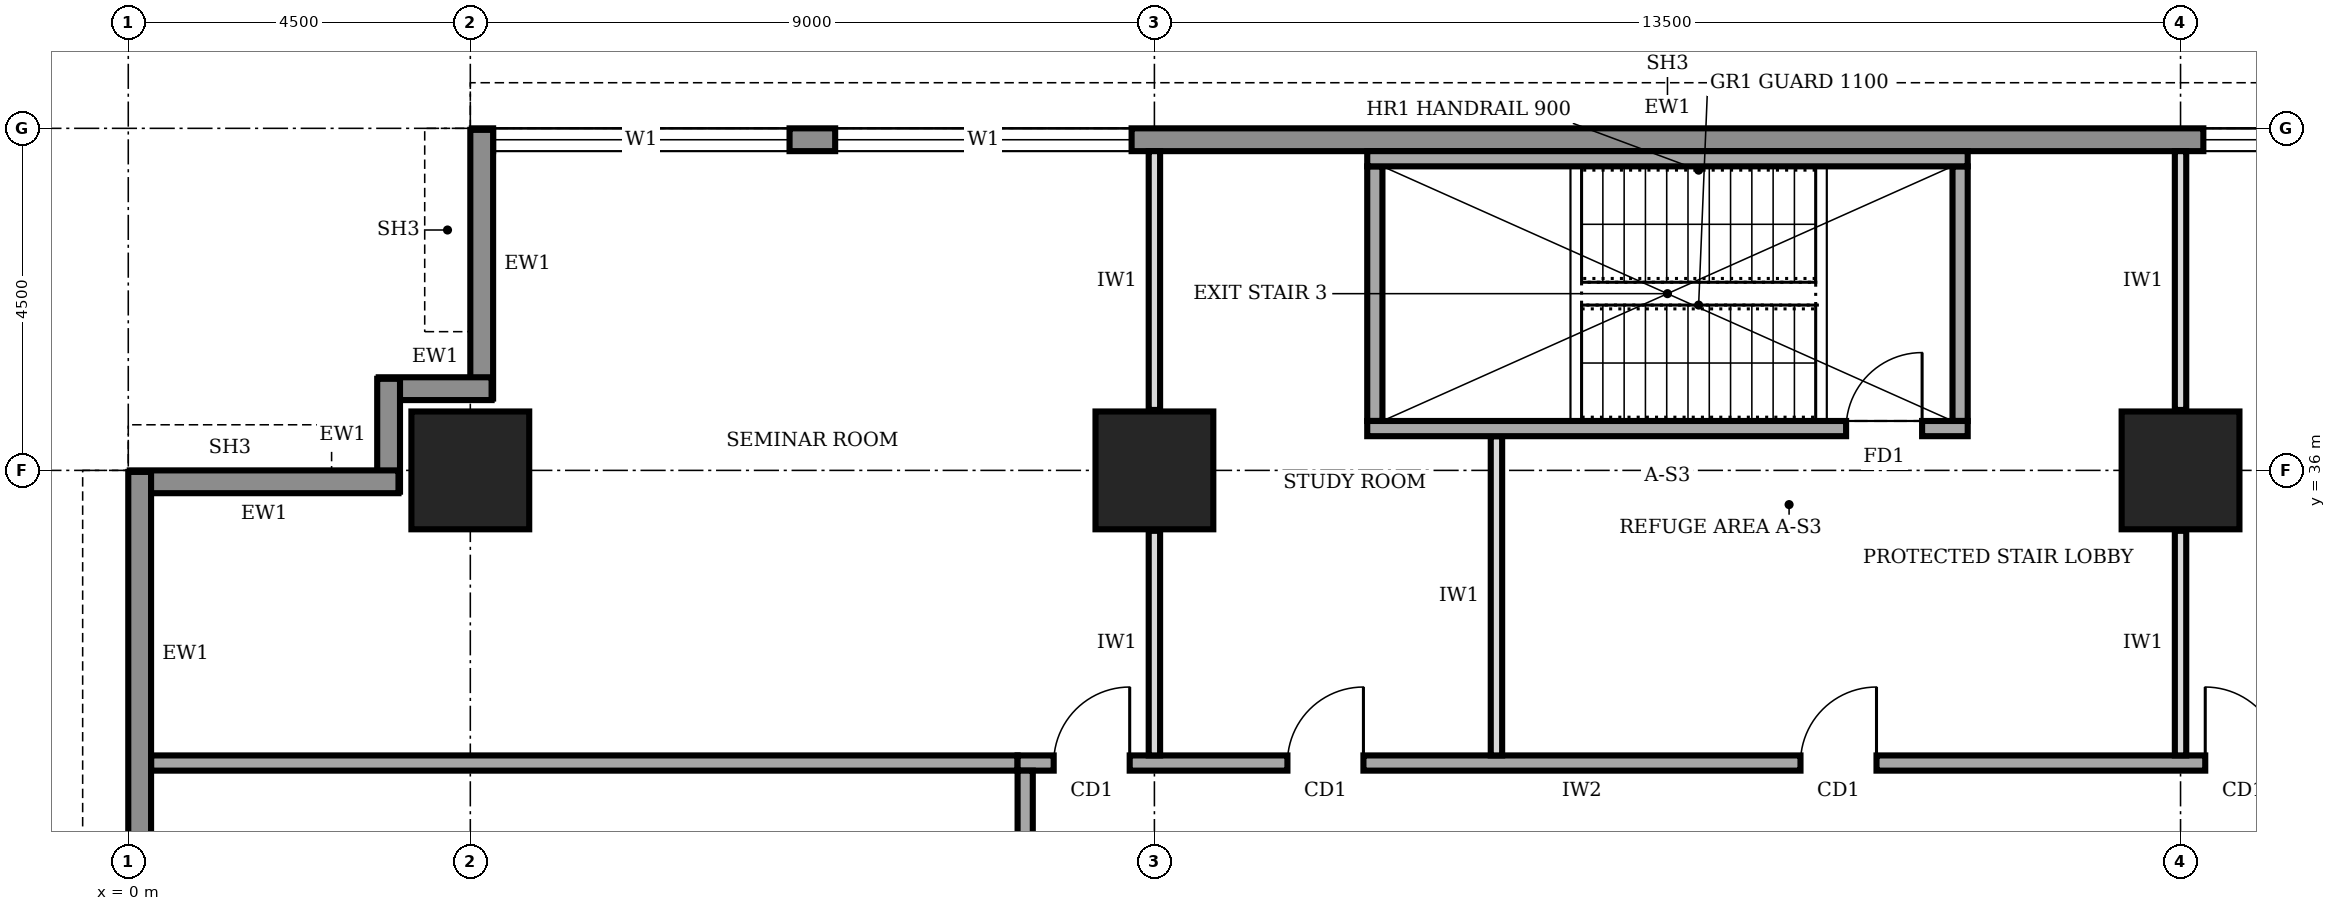
"""IFC4 building model, lengths in metres.
Left out: names, types, materials, properties, quantities, classifications, styles, units other than length and angle.
Written with IfcOpenShell. Run it as: python <this file> out.ifc"""

import sys

from ifc_helpers import new_model, si_unit, direction, frame, frame_2d, origin, origin_2d, place, context, subcontext, project, spatial, rectangle, extrude, element, fill, save


model = new_model("IFC4")
c1 = context("Model", 3, precision=1e-05, world=origin(), true_north=direction((0.0, 1.0)))
c2 = subcontext(c1, "Body", "Model", "MODEL_VIEW")
j1 = project(units=[si_unit("LENGTHUNIT", "METRE"), si_unit("PLANEANGLEUNIT", "RADIAN")], contexts=[c1])
p1 = place(None, origin())
s1 = spatial("IfcSite", under=j1, at=p1, CompositionType="ELEMENT")
p2 = place(p1, origin())
s2 = spatial("IfcBuilding", under=s1, at=p2, CompositionType="ELEMENT")
p3 = place(p2, frame((0.0, 0.0, 217.0)))
s3 = spatial("IfcBuildingStorey", under=s2, at=p3, CompositionType="ELEMENT", Elevation=217.0)
for number, where, z_axis, x_axis in (
    (1, (4.5, 36.0, 0.0), (0.0, 0.0, 1.0), (1.0, 0.0, 0.0)),
    (2, (13.5, 36.0, 0.0), (0.0, 0.0, 1.0), (1.0, 0.0, 0.0)),
    (3, (27.0, 36.0, 0.0), (0.0, 0.0, 1.0), (1.0, 0.0, 0.0)),
):
    element("IfcColumn", number, at=place(p3, frame(where, z_axis=z_axis, x_axis=x_axis)), inside=s3, PredefinedType="COLUMN", context=c2, shape_type="SweptSolid", body=[
        extrude(rectangle(XDim=1.55, YDim=1.55, at=origin_2d()), origin(), (0.0, 0.0, 1.0), 4.0),
    ])
p4 = place(p3, frame((35.98, 40.35, 0.0), z_axis=(0.0, 0.0, 1.0), x_axis=(-1.0, 0.0, 0.0)))
e4 = element("IfcWall", 4, at=p4, inside=s3, PredefinedType="STANDARD", context=c2, shape_type="SweptSolid", body=[
    extrude(rectangle(XDim=31.46, YDim=0.3, at=frame_2d((15.73, 0.0))), origin(), (0.0, 0.0, 1.0), 3.75),
])
p5 = place(p4, frame((27.28, 0.0, 0.9)))
e5 = element("IfcOpeningElement", 5, at=p5, cuts=e4, PredefinedType="OPENING", context=c2, shape_type="SweptSolid", body=[
    extrude(rectangle(XDim=3.9, YDim=2.2, at=frame_2d((1.95, 1.1))), frame((0.0, 0.16, 0.0), z_axis=(0.0, -1.0, 0.0), x_axis=(1.0, 0.0, 0.0)), (0.0, 0.0, 1.0), 0.32),
])
p6 = place(p4, frame((22.78, 0.0, 0.9)))
e6 = element("IfcOpeningElement", 6, at=p6, cuts=e4, PredefinedType="OPENING", context=c2, shape_type="SweptSolid", body=[
    extrude(rectangle(XDim=3.9, YDim=2.2, at=frame_2d((1.95, 1.1))), frame((0.0, 0.16, 0.0), z_axis=(0.0, -1.0, 0.0), x_axis=(1.0, 0.0, 0.0)), (0.0, 0.0, 1.0), 0.32),
])
p7 = place(p4, frame((4.78, 0.0, 0.9)))
e7 = element("IfcOpeningElement", 7, at=p7, cuts=e4, PredefinedType="OPENING", context=c2, shape_type="SweptSolid", body=[
    extrude(rectangle(XDim=3.9, YDim=2.2, at=frame_2d((1.95, 1.1))), frame((0.0, 0.16, 0.0), z_axis=(0.0, -1.0, 0.0), x_axis=(1.0, 0.0, 0.0)), (0.0, 0.0, 1.0), 0.32),
])
p8 = place(p3, frame((4.65, 40.48, 0.0), z_axis=(0.0, 0.0, 1.0), x_axis=(0.0, -1.0, 0.0)))
e8 = element("IfcWall", 8, at=p8, inside=s3, PredefinedType="STANDARD", context=c2, shape_type="SweptSolid", body=[
    extrude(rectangle(XDim=3.535, YDim=0.3, at=frame_2d((1.768, 0.0))), origin(), (0.0, 0.0, 1.0), 2.85),
])
for number, where, z_axis, x_axis in (
    (9, (4.78, 37.075, 0.0), (0.0, 0.0, 1.0), (-1.0, 0.0, 0.0)),
    (10, (3.425, 37.205, 0.0), (0.0, 0.0, 1.0), (0.0, -1.0, 0.0)),
):
    element("IfcWall", number, at=place(p3, frame(where, z_axis=z_axis, x_axis=x_axis)), inside=s3, PredefinedType="STANDARD", context=c2, shape_type="SweptSolid", body=[
        extrude(rectangle(XDim=1.485, YDim=0.3, at=frame_2d((0.743, 0.0))), origin(), (0.0, 0.0, 1.0), 3.75),
    ])
p9 = place(p3, frame((3.555, 35.85, 0.0), z_axis=(0.0, 0.0, 1.0), x_axis=(-1.0, 0.0, 0.0)))
e11 = element("IfcWall", 11, at=p9, inside=s3, PredefinedType="STANDARD", context=c2, shape_type="SweptSolid", body=[
    extrude(rectangle(XDim=3.535, YDim=0.3, at=frame_2d((1.768, 0.0))), origin(), (0.0, 0.0, 1.0), 2.85),
])
p10 = place(p3, frame((0.15, 35.98, 0.0), z_axis=(0.0, 0.0, 1.0), x_axis=(0.0, -1.0, 0.0)))
e12 = element("IfcWall", 12, at=p10, inside=s3, PredefinedType="STANDARD", context=c2, shape_type="SweptSolid", body=[
    extrude(rectangle(XDim=31.46, YDim=0.3, at=frame_2d((15.73, 0.0))), origin(), (0.0, 0.0, 1.0), 3.75),
])
p11 = place(p10, frame((27.28, 0.0, 0.9)))
e13 = element("IfcOpeningElement", 13, at=p11, cuts=e12, PredefinedType="OPENING", context=c2, shape_type="SweptSolid", body=[
    extrude(rectangle(XDim=3.9, YDim=2.2, at=frame_2d((1.95, 1.1))), frame((0.0, 0.16, 0.0), z_axis=(0.0, -1.0, 0.0), x_axis=(1.0, 0.0, 0.0)), (0.0, 0.0, 1.0), 0.32),
])
p12 = place(p10, frame((22.78, 0.0, 0.9)))
e14 = element("IfcOpeningElement", 14, at=p12, cuts=e12, PredefinedType="OPENING", context=c2, shape_type="SweptSolid", body=[
    extrude(rectangle(XDim=3.9, YDim=2.2, at=frame_2d((1.95, 1.1))), frame((0.0, 0.16, 0.0), z_axis=(0.0, -1.0, 0.0), x_axis=(1.0, 0.0, 0.0)), (0.0, 0.0, 1.0), 0.32),
])
p13 = place(p10, frame((18.28, 0.0, 0.9)))
e15 = element("IfcOpeningElement", 15, at=p13, cuts=e12, PredefinedType="OPENING", context=c2, shape_type="SweptSolid", body=[
    extrude(rectangle(XDim=3.9, YDim=2.2, at=frame_2d((1.95, 1.1))), frame((0.0, 0.16, 0.0), z_axis=(0.0, -1.0, 0.0), x_axis=(1.0, 0.0, 0.0)), (0.0, 0.0, 1.0), 0.32),
])
p14 = place(p10, frame((13.78, 0.0, 0.9)))
e16 = element("IfcOpeningElement", 16, at=p14, cuts=e12, PredefinedType="OPENING", context=c2, shape_type="SweptSolid", body=[
    extrude(rectangle(XDim=3.9, YDim=2.2, at=frame_2d((1.95, 1.1))), frame((0.0, 0.16, 0.0), z_axis=(0.0, -1.0, 0.0), x_axis=(1.0, 0.0, 0.0)), (0.0, 0.0, 1.0), 0.32),
])
p15 = place(p10, frame((9.28, 0.0, 0.9)))
e17 = element("IfcOpeningElement", 17, at=p15, cuts=e12, PredefinedType="OPENING", context=c2, shape_type="SweptSolid", body=[
    extrude(rectangle(XDim=3.9, YDim=2.2, at=frame_2d((1.95, 1.1))), frame((0.0, 0.16, 0.0), z_axis=(0.0, -1.0, 0.0), x_axis=(1.0, 0.0, 0.0)), (0.0, 0.0, 1.0), 0.32),
])
p16 = place(p10, frame((4.78, 0.0, 0.9)))
e18 = element("IfcOpeningElement", 18, at=p16, cuts=e12, PredefinedType="OPENING", context=c2, shape_type="SweptSolid", body=[
    extrude(rectangle(XDim=3.9, YDim=2.2, at=frame_2d((1.95, 1.1))), frame((0.0, 0.16, 0.0), z_axis=(0.0, -1.0, 0.0), x_axis=(1.0, 0.0, 0.0)), (0.0, 0.0, 1.0), 0.32),
])
p17 = place(p3, frame((28.6, 32.15, 0.0), z_axis=(0.0, 0.0, 1.0), x_axis=(-1.0, 0.0, 0.0)))
e19 = element("IfcWall", 19, at=p17, inside=s3, PredefinedType="SOLIDWALL", context=c2, shape_type="SweptSolid", body=[
    extrude(rectangle(XDim=16.9, YDim=0.2, at=frame_2d((8.45, 0.0))), origin(), (0.0, 0.0, 1.0), 3.75),
])
p18 = place(p17, frame((15.425, 0.0, 0.0)))
e20 = element("IfcOpeningElement", 20, at=p18, cuts=e19, PredefinedType="OPENING", context=c2, shape_type="SweptSolid", body=[
    extrude(rectangle(XDim=1.0, YDim=2.1, at=frame_2d((0.5, 1.05))), frame((0.0, 0.11, 0.0), z_axis=(0.0, -1.0, 0.0), x_axis=(1.0, 0.0, 0.0)), (0.0, 0.0, 1.0), 0.22),
])
p19 = place(p17, frame((12.35, 0.0, 0.0)))
e21 = element("IfcOpeningElement", 21, at=p19, cuts=e19, PredefinedType="OPENING", context=c2, shape_type="SweptSolid", body=[
    extrude(rectangle(XDim=1.0, YDim=2.1, at=frame_2d((0.5, 1.05))), frame((0.0, 0.11, 0.0), z_axis=(0.0, -1.0, 0.0), x_axis=(1.0, 0.0, 0.0)), (0.0, 0.0, 1.0), 0.22),
])
p20 = place(p17, frame((5.6, 0.0, 0.0)))
e22 = element("IfcOpeningElement", 22, at=p20, cuts=e19, PredefinedType="OPENING", context=c2, shape_type="SweptSolid", body=[
    extrude(rectangle(XDim=1.0, YDim=2.1, at=frame_2d((0.5, 1.05))), frame((0.0, 0.11, 0.0), z_axis=(0.0, -1.0, 0.0), x_axis=(1.0, 0.0, 0.0)), (0.0, 0.0, 1.0), 0.22),
])
p21 = place(p17, frame((0.275, 0.0, 0.0)))
e23 = element("IfcOpeningElement", 23, at=p21, cuts=e19, PredefinedType="OPENING", context=c2, shape_type="SweptSolid", body=[
    extrude(rectangle(XDim=1.0, YDim=2.1, at=frame_2d((0.5, 1.05))), frame((0.0, 0.11, 0.0), z_axis=(0.0, -1.0, 0.0), x_axis=(1.0, 0.0, 0.0)), (0.0, 0.0, 1.0), 0.22),
])
p22 = place(p3, frame((11.8, 32.05, 0.0), z_axis=(0.0, 0.0, 1.0), x_axis=(0.0, -1.0, 0.0)))
e24 = element("IfcWall", 24, at=p22, inside=s3, PredefinedType="SOLIDWALL", context=c2, shape_type="SweptSolid", body=[
    extrude(rectangle(XDim=23.8, YDim=0.2, at=frame_2d((11.9, 0.0))), origin(), (0.0, 0.0, 1.0), 3.75),
])
p23 = place(p22, frame((20.675, 0.0, 0.0)))
e25 = element("IfcOpeningElement", 25, at=p23, cuts=e24, PredefinedType="OPENING", context=c2, shape_type="SweptSolid", body=[
    extrude(rectangle(XDim=1.0, YDim=2.1, at=frame_2d((0.5, 1.05))), frame((0.0, 0.11, 0.0), z_axis=(0.0, -1.0, 0.0), x_axis=(1.0, 0.0, 0.0)), (0.0, 0.0, 1.0), 0.22),
])
p24 = place(p22, frame((16.4, 0.0, 0.0)))
e26 = element("IfcOpeningElement", 26, at=p24, cuts=e24, PredefinedType="OPENING", context=c2, shape_type="SweptSolid", body=[
    extrude(rectangle(XDim=0.9, YDim=2.1, at=frame_2d((0.45, 1.05))), frame((0.0, 0.11, 0.0), z_axis=(0.0, -1.0, 0.0), x_axis=(1.0, 0.0, 0.0)), (0.0, 0.0, 1.0), 0.22),
])
p25 = place(p22, frame((11.6, 0.0, 0.0)))
e27 = element("IfcOpeningElement", 27, at=p25, cuts=e24, PredefinedType="OPENING", context=c2, shape_type="SweptSolid", body=[
    extrude(rectangle(XDim=0.9, YDim=2.1, at=frame_2d((0.45, 1.05))), frame((0.0, 0.11, 0.0), z_axis=(0.0, -1.0, 0.0), x_axis=(1.0, 0.0, 0.0)), (0.0, 0.0, 1.0), 0.22),
])
p26 = place(p22, frame((8.55, 0.0, 0.0)))
e28 = element("IfcOpeningElement", 28, at=p26, cuts=e24, PredefinedType="OPENING", context=c2, shape_type="SweptSolid", body=[
    extrude(rectangle(XDim=0.9, YDim=2.1, at=frame_2d((0.45, 1.05))), frame((0.0, 0.11, 0.0), z_axis=(0.0, -1.0, 0.0), x_axis=(1.0, 0.0, 0.0)), (0.0, 0.0, 1.0), 0.22),
])
p27 = place(p22, frame((5.55, 0.0, 0.0)))
e29 = element("IfcOpeningElement", 29, at=p27, cuts=e24, PredefinedType="OPENING", context=c2, shape_type="SweptSolid", body=[
    extrude(rectangle(XDim=1.0, YDim=2.1, at=frame_2d((0.5, 1.05))), frame((0.0, 0.11, 0.0), z_axis=(0.0, -1.0, 0.0), x_axis=(1.0, 0.0, 0.0)), (0.0, 0.0, 1.0), 0.22),
])
p28 = place(p22, frame((13.65, 0.0, 0.0)))
e30 = element("IfcOpeningElement", 30, at=p28, cuts=e24, PredefinedType="OPENING", context=c2, shape_type="SweptSolid", body=[
    extrude(rectangle(XDim=1.0, YDim=2.1, at=frame_2d((0.5, 1.05))), frame((0.0, 0.11, 0.0), z_axis=(0.0, -1.0, 0.0), x_axis=(1.0, 0.0, 0.0)), (0.0, 0.0, 1.0), 0.22),
])
p29 = place(p22, frame((1.925, 0.0, 0.0)))
e31 = element("IfcOpeningElement", 31, at=p29, cuts=e24, PredefinedType="OPENING", context=c2, shape_type="SweptSolid", body=[
    extrude(rectangle(XDim=1.0, YDim=2.1, at=frame_2d((0.5, 1.05))), frame((0.0, 0.11, 0.0), z_axis=(0.0, -1.0, 0.0), x_axis=(1.0, 0.0, 0.0)), (0.0, 0.0, 1.0), 0.22),
])
p30 = place(p3, frame((0.3, 32.15, 0.0), z_axis=(0.0, 0.0, 1.0), x_axis=(1.0, 0.0, 0.0)))
e32 = element("IfcWall", 32, at=p30, inside=s3, PredefinedType="SOLIDWALL", context=c2, shape_type="SweptSolid", body=[
    extrude(rectangle(XDim=11.4, YDim=0.2, at=frame_2d((5.7, 0.0))), origin(), (0.0, 0.0, 1.0), 3.75),
])
p31 = place(p3, frame((13.5, 32.25, 0.0), z_axis=(0.0, 0.0, 1.0), x_axis=(0.0, 1.0, 0.0)))
e33 = element("IfcWall", 33, at=p31, inside=s3, PredefinedType="PARTITIONING", context=c2, shape_type="SweptSolid", body=[
    extrude(rectangle(XDim=2.955, YDim=0.15, at=frame_2d((1.478, 0.0))), origin(), (0.0, 0.0, 1.0), 2.85),
])
p32 = place(p3, frame((13.5, 36.795, 0.0), z_axis=(0.0, 0.0, 1.0), x_axis=(0.0, 1.0, 0.0)))
e34 = element("IfcWall", 34, at=p32, inside=s3, PredefinedType="PARTITIONING", context=c2, shape_type="SweptSolid", body=[
    extrude(rectangle(XDim=3.405, YDim=0.15, at=frame_2d((1.703, 0.0))), origin(), (0.0, 0.0, 1.0), 2.85),
])
p33 = place(p3, frame((18.0, 32.25, 0.0), z_axis=(0.0, 0.0, 1.0), x_axis=(0.0, 1.0, 0.0)))
e35 = element("IfcWall", 35, at=p33, inside=s3, PredefinedType="PARTITIONING", context=c2, shape_type="SweptSolid", body=[
    extrude(rectangle(XDim=4.2, YDim=0.15, at=frame_2d((2.1, 0.0))), origin(), (0.0, 0.0, 1.0), 3.75),
])
p34 = place(p3, frame((27.0, 32.25, 0.0), z_axis=(0.0, 0.0, 1.0), x_axis=(0.0, 1.0, 0.0)))
e36 = element("IfcWall", 36, at=p34, inside=s3, PredefinedType="PARTITIONING", context=c2, shape_type="SweptSolid", body=[
    extrude(rectangle(XDim=2.955, YDim=0.15, at=frame_2d((1.478, 0.0))), origin(), (0.0, 0.0, 1.0), 2.85),
])
p35 = place(p3, frame((27.0, 36.795, 0.0), z_axis=(0.0, 0.0, 1.0), x_axis=(0.0, 1.0, 0.0)))
e37 = element("IfcWall", 37, at=p35, inside=s3, PredefinedType="PARTITIONING", context=c2, shape_type="SweptSolid", body=[
    extrude(rectangle(XDim=3.405, YDim=0.15, at=frame_2d((1.703, 0.0))), origin(), (0.0, 0.0, 1.0), 2.85),
])
p36 = place(p3, frame((16.3, 36.55, 0.0), z_axis=(0.0, 0.0, 1.0), x_axis=(1.0, 0.0, 0.0)))
e38 = element("IfcWall", 38, at=p36, inside=s3, PredefinedType="SOLIDWALL", context=c2, shape_type="SweptSolid", body=[
    extrude(rectangle(XDim=7.9, YDim=0.2, at=frame_2d((3.95, 0.0))), origin(), (0.0, 0.0, 1.0), 3.75),
])
p37 = place(p36, frame((6.3, 0.0, 0.0)))
e39 = element("IfcOpeningElement", 39, at=p37, cuts=e38, PredefinedType="OPENING", context=c2, shape_type="SweptSolid", body=[
    extrude(rectangle(XDim=1.0, YDim=2.1, at=frame_2d((0.5, 1.05))), frame((0.0, 0.11, 0.0), z_axis=(0.0, -1.0, 0.0), x_axis=(1.0, 0.0, 0.0)), (0.0, 0.0, 1.0), 0.22),
])
p38 = place(p3, frame((16.3, 40.1, 0.0), z_axis=(0.0, 0.0, 1.0), x_axis=(1.0, 0.0, 0.0)))
e40 = element("IfcWall", 40, at=p38, inside=s3, PredefinedType="SOLIDWALL", context=c2, shape_type="SweptSolid", body=[
    extrude(rectangle(XDim=7.9, YDim=0.2, at=frame_2d((3.95, 0.0))), origin(), (0.0, 0.0, 1.0), 3.75),
])
for number, where, z_axis, x_axis in (
    (41, (16.4, 36.65, 0.0), (0.0, 0.0, 1.0), (0.0, 1.0, 0.0)),
    (42, (24.1, 36.65, 0.0), (0.0, 0.0, 1.0), (0.0, 1.0, 0.0)),
):
    element("IfcWall", number, at=place(p3, frame(where, z_axis=z_axis, x_axis=x_axis)), inside=s3, PredefinedType="SOLIDWALL", context=c2, shape_type="SweptSolid", body=[
        extrude(rectangle(XDim=3.35, YDim=0.2, at=frame_2d((1.675, 0.0))), origin(), (0.0, 0.0, 1.0), 3.75),
    ])
p39 = place(p5, origin())
e43 = element("IfcWindow", 43, at=p39, inside=s3, PartitioningType="SINGLE_PANEL", PredefinedType="WINDOW", context=c2, shape_type="SweptSolid", body=[
    extrude(rectangle(XDim=3.9, YDim=2.2, at=frame_2d((1.95, 1.1))), frame((0.0, 0.03, 0.0), z_axis=(0.0, -1.0, 0.0), x_axis=(1.0, 0.0, 0.0)), (0.0, 0.0, 1.0), 0.06),
])
fill(e5, e43)
p40 = place(p6, origin())
e44 = element("IfcWindow", 44, at=p40, inside=s3, PartitioningType="SINGLE_PANEL", PredefinedType="WINDOW", context=c2, shape_type="SweptSolid", body=[
    extrude(rectangle(XDim=3.9, YDim=2.2, at=frame_2d((1.95, 1.1))), frame((0.0, 0.03, 0.0), z_axis=(0.0, -1.0, 0.0), x_axis=(1.0, 0.0, 0.0)), (0.0, 0.0, 1.0), 0.06),
])
fill(e6, e44)
p41 = place(p7, origin())
e45 = element("IfcWindow", 45, at=p41, inside=s3, PartitioningType="SINGLE_PANEL", PredefinedType="WINDOW", context=c2, shape_type="SweptSolid", body=[
    extrude(rectangle(XDim=3.9, YDim=2.2, at=frame_2d((1.95, 1.1))), frame((0.0, 0.03, 0.0), z_axis=(0.0, -1.0, 0.0), x_axis=(1.0, 0.0, 0.0)), (0.0, 0.0, 1.0), 0.06),
])
fill(e7, e45)
p42 = place(p18, frame((1.0, 0.0, 0.0), z_axis=(0.0, 0.0, 1.0), x_axis=(-1.0, 0.0, 0.0)))
e46 = element("IfcDoor", 46, at=p42, inside=s3, OperationType="SINGLE_SWING_RIGHT", PredefinedType="DOOR", context=c2, shape_type="SweptSolid", body=[
    extrude(rectangle(XDim=1.0, YDim=2.1, at=frame_2d((0.5, 1.05))), frame((0.0, 0.025, 0.0), z_axis=(0.0, -1.0, 0.0), x_axis=(1.0, 0.0, 0.0)), (0.0, 0.0, 1.0), 0.05),
])
fill(e20, e46)
p43 = place(p19, frame((1.0, 0.0, 0.0), z_axis=(0.0, 0.0, 1.0), x_axis=(-1.0, 0.0, 0.0)))
e47 = element("IfcDoor", 47, at=p43, inside=s3, OperationType="SINGLE_SWING_RIGHT", PredefinedType="DOOR", context=c2, shape_type="SweptSolid", body=[
    extrude(rectangle(XDim=1.0, YDim=2.1, at=frame_2d((0.5, 1.05))), frame((0.0, 0.025, 0.0), z_axis=(0.0, -1.0, 0.0), x_axis=(1.0, 0.0, 0.0)), (0.0, 0.0, 1.0), 0.05),
])
fill(e21, e47)
p44 = place(p20, frame((1.0, 0.0, 0.0), z_axis=(0.0, 0.0, 1.0), x_axis=(-1.0, 0.0, 0.0)))
e48 = element("IfcDoor", 48, at=p44, inside=s3, OperationType="SINGLE_SWING_RIGHT", PredefinedType="DOOR", context=c2, shape_type="SweptSolid", body=[
    extrude(rectangle(XDim=1.0, YDim=2.1, at=frame_2d((0.5, 1.05))), frame((0.0, 0.025, 0.0), z_axis=(0.0, -1.0, 0.0), x_axis=(1.0, 0.0, 0.0)), (0.0, 0.0, 1.0), 0.05),
])
fill(e22, e48)
p45 = place(p21, frame((1.0, 0.0, 0.0), z_axis=(0.0, 0.0, 1.0), x_axis=(-1.0, 0.0, 0.0)))
e49 = element("IfcDoor", 49, at=p45, inside=s3, OperationType="SINGLE_SWING_LEFT", PredefinedType="DOOR", context=c2, shape_type="SweptSolid", body=[
    extrude(rectangle(XDim=1.0, YDim=2.1, at=frame_2d((0.5, 1.05))), frame((0.0, 0.025, 0.0), z_axis=(0.0, -1.0, 0.0), x_axis=(1.0, 0.0, 0.0)), (0.0, 0.0, 1.0), 0.05),
])
fill(e23, e49)
p46 = place(p37, origin())
e50 = element("IfcDoor", 50, at=p46, inside=s3, OperationType="SINGLE_SWING_RIGHT", PredefinedType="DOOR", context=c2, shape_type="SweptSolid", body=[
    extrude(rectangle(XDim=1.0, YDim=2.1, at=frame_2d((0.5, 1.05))), frame((0.0, 0.025, 0.0), z_axis=(0.0, -1.0, 0.0), x_axis=(1.0, 0.0, 0.0)), (0.0, 0.0, 1.0), 0.05),
])
fill(e39, e50)
save(model, sys.argv[1])
